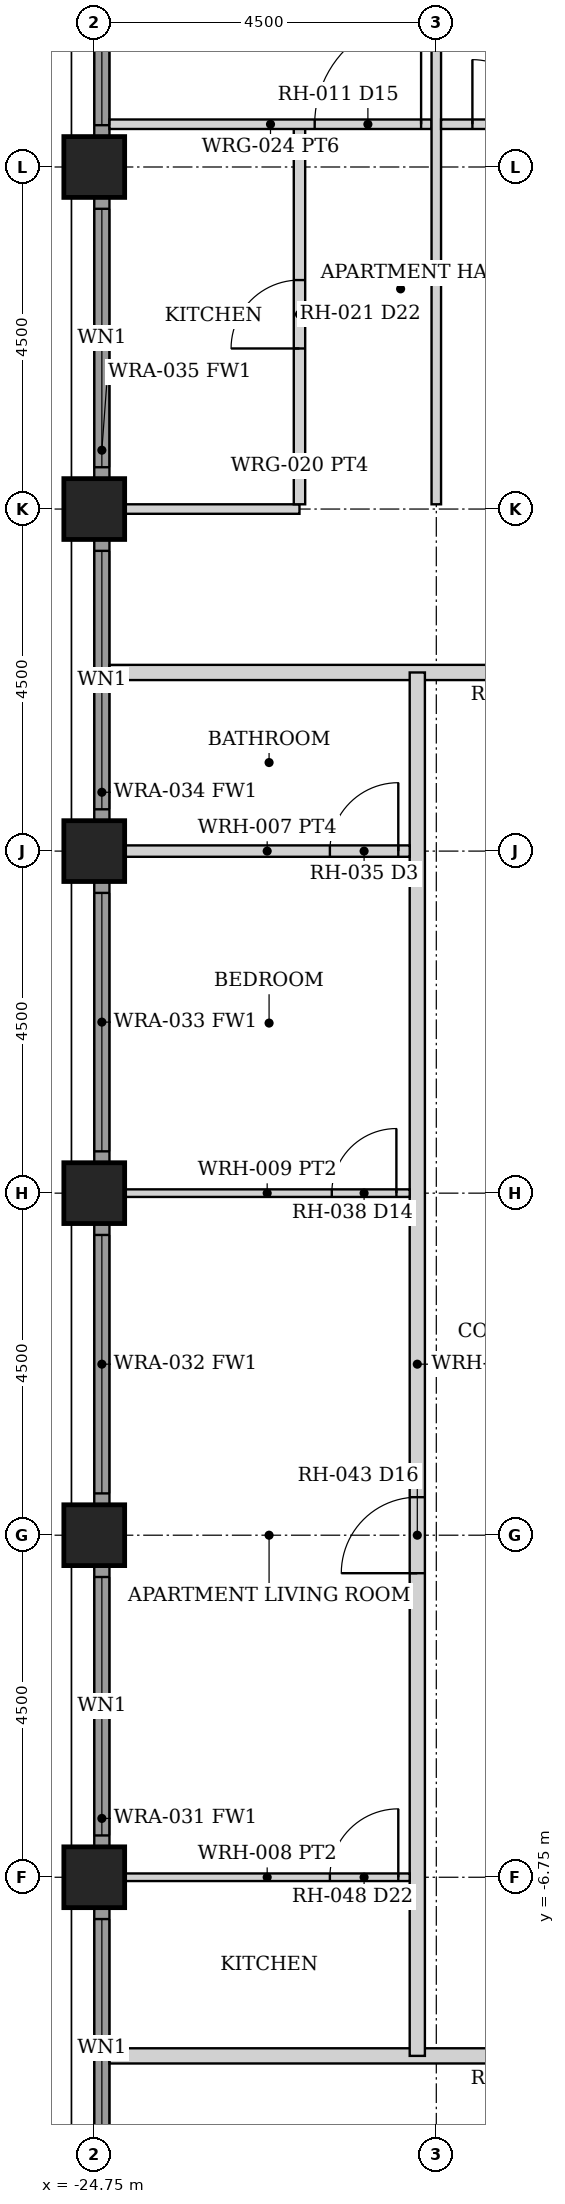
"""IFC4 building model, lengths in metres.
Left out: names, types, materials, properties, quantities, classifications, styles, units other than length and angle.
Written with IfcOpenShell. Run it as: python <this file> out.ifc"""

import sys

from ifc_helpers import new_model, si_unit, direction, frame, frame_2d, origin, origin_2d, place, context, subcontext, project, spatial, rectangle, hollow_rectangle, extrude, element, fill, save


model = new_model("IFC4")
c1 = context("Model", 3, precision=1e-05, world=origin(), true_north=direction((0.0, 1.0)))
c2 = subcontext(c1, "Body", "Model", "MODEL_VIEW")
j1 = project(units=[si_unit("LENGTHUNIT", "METRE"), si_unit("PLANEANGLEUNIT", "RADIAN")], contexts=[c1])
p1 = place(None, origin())
s1 = spatial("IfcSite", under=j1, at=p1, CompositionType="ELEMENT")
p2 = place(p1, origin())
s2 = spatial("IfcBuilding", under=s1, at=p2, CompositionType="ELEMENT")
p3 = place(p2, frame((0.0, 0.0, 100.0)))
s3 = spatial("IfcBuildingStorey", under=s2, at=p3, CompositionType="ELEMENT", Elevation=100.0)
for number, where, z_axis, x_axis in (
    (1, (-24.75, -6.75, 0.0), (0.0, 0.0, 1.0), (1.0, 0.0, 0.0)),
    (2, (-24.75, -2.25, 0.0), (0.0, 0.0, 1.0), (1.0, 0.0, 0.0)),
    (3, (-24.75, 2.25, 0.0), (0.0, 0.0, 1.0), (1.0, 0.0, 0.0)),
    (4, (-24.75, 6.75, 0.0), (0.0, 0.0, 1.0), (1.0, 0.0, 0.0)),
    (5, (-24.75, 11.25, 0.0), (0.0, 0.0, 1.0), (1.0, 0.0, 0.0)),
    (6, (-24.75, 15.75, 0.0), (0.0, 0.0, 1.0), (1.0, 0.0, 0.0)),
):
    element("IfcColumn", number, at=place(p3, frame(where, z_axis=z_axis, x_axis=x_axis)), inside=s3, PredefinedType="COLUMN", context=c2, shape_type="SweptSolid", body=[
        extrude(hollow_rectangle(XDim=0.8, YDim=0.8, WallThickness=0.06, at=origin_2d()), origin(), (0.0, 0.0, 1.0), 3.5),
    ])
p4 = place(p3, frame((-24.65, -10.845, 0.0), z_axis=(0.0, 0.0, 1.0), x_axis=(0.0, 1.0, 0.0)))
e7 = element("IfcWall", 7, at=p4, inside=s3, PredefinedType="SOLIDWALL", context=c2, shape_type="SweptSolid", body=[
    extrude(rectangle(XDim=3.69, YDim=0.2, at=frame_2d((1.845, 0.0))), origin(), (0.0, 0.0, 1.0), 2.379),
])
p5 = place(p4, frame((0.145, 0.0, 0.3)))
e8 = element("IfcOpeningElement", 8, at=p5, cuts=e7, PredefinedType="OPENING", context=c2, shape_type="SweptSolid", body=[
    extrude(rectangle(XDim=3.4, YDim=1.929, at=frame_2d((1.7, 0.964))), frame((0.0, 0.11, 0.0), z_axis=(0.0, -1.0, 0.0), x_axis=(1.0, 0.0, 0.0)), (0.0, 0.0, 1.0), 0.22),
])
p6 = place(p3, frame((-24.65, -6.345, 0.0), z_axis=(0.0, 0.0, 1.0), x_axis=(0.0, 1.0, 0.0)))
e9 = element("IfcWall", 9, at=p6, inside=s3, PredefinedType="SOLIDWALL", context=c2, shape_type="SweptSolid", body=[
    extrude(rectangle(XDim=3.69, YDim=0.2, at=frame_2d((1.845, 0.0))), origin(), (0.0, 0.0, 1.0), 2.379),
])
p7 = place(p6, frame((0.145, 0.0, 0.3)))
e10 = element("IfcOpeningElement", 10, at=p7, cuts=e9, PredefinedType="OPENING", context=c2, shape_type="SweptSolid", body=[
    extrude(rectangle(XDim=3.4, YDim=1.929, at=frame_2d((1.7, 0.964))), frame((0.0, 0.11, 0.0), z_axis=(0.0, -1.0, 0.0), x_axis=(1.0, 0.0, 0.0)), (0.0, 0.0, 1.0), 0.22),
])
p8 = place(p3, frame((-24.65, -1.845, 0.0), z_axis=(0.0, 0.0, 1.0), x_axis=(0.0, 1.0, 0.0)))
e11 = element("IfcWall", 11, at=p8, inside=s3, PredefinedType="SOLIDWALL", context=c2, shape_type="SweptSolid", body=[
    extrude(rectangle(XDim=3.69, YDim=0.2, at=frame_2d((1.845, 0.0))), origin(), (0.0, 0.0, 1.0), 2.379),
])
p9 = place(p8, frame((0.145, 0.0, 0.3)))
e12 = element("IfcOpeningElement", 12, at=p9, cuts=e11, PredefinedType="OPENING", context=c2, shape_type="SweptSolid", body=[
    extrude(rectangle(XDim=3.4, YDim=1.929, at=frame_2d((1.7, 0.964))), frame((0.0, 0.11, 0.0), z_axis=(0.0, -1.0, 0.0), x_axis=(1.0, 0.0, 0.0)), (0.0, 0.0, 1.0), 0.22),
])
p10 = place(p3, frame((-24.65, 2.655, 0.0), z_axis=(0.0, 0.0, 1.0), x_axis=(0.0, 1.0, 0.0)))
e13 = element("IfcWall", 13, at=p10, inside=s3, PredefinedType="SOLIDWALL", context=c2, shape_type="SweptSolid", body=[
    extrude(rectangle(XDim=3.69, YDim=0.2, at=frame_2d((1.845, 0.0))), origin(), (0.0, 0.0, 1.0), 2.379),
])
p11 = place(p10, frame((0.145, 0.0, 0.3)))
e14 = element("IfcOpeningElement", 14, at=p11, cuts=e13, PredefinedType="OPENING", context=c2, shape_type="SweptSolid", body=[
    extrude(rectangle(XDim=3.4, YDim=1.929, at=frame_2d((1.7, 0.964))), frame((0.0, 0.11, 0.0), z_axis=(0.0, -1.0, 0.0), x_axis=(1.0, 0.0, 0.0)), (0.0, 0.0, 1.0), 0.22),
])
p12 = place(p3, frame((-24.65, 7.155, 0.0), z_axis=(0.0, 0.0, 1.0), x_axis=(0.0, 1.0, 0.0)))
e15 = element("IfcWall", 15, at=p12, inside=s3, PredefinedType="SOLIDWALL", context=c2, shape_type="SweptSolid", body=[
    extrude(rectangle(XDim=3.69, YDim=0.2, at=frame_2d((1.845, 0.0))), origin(), (0.0, 0.0, 1.0), 2.379),
])
p13 = place(p12, frame((0.145, 0.0, 0.3)))
e16 = element("IfcOpeningElement", 16, at=p13, cuts=e15, PredefinedType="OPENING", context=c2, shape_type="SweptSolid", body=[
    extrude(rectangle(XDim=3.4, YDim=1.929, at=frame_2d((1.7, 0.964))), frame((0.0, 0.11, 0.0), z_axis=(0.0, -1.0, 0.0), x_axis=(1.0, 0.0, 0.0)), (0.0, 0.0, 1.0), 0.22),
])
p14 = place(p3, frame((-24.65, 11.655, 0.0), z_axis=(0.0, 0.0, 1.0), x_axis=(0.0, 1.0, 0.0)))
e17 = element("IfcWall", 17, at=p14, inside=s3, PredefinedType="SOLIDWALL", context=c2, shape_type="SweptSolid", body=[
    extrude(rectangle(XDim=3.69, YDim=0.2, at=frame_2d((1.845, 0.0))), origin(), (0.0, 0.0, 1.0), 2.379),
])
p15 = place(p14, frame((0.145, 0.0, 0.3)))
e18 = element("IfcOpeningElement", 18, at=p15, cuts=e17, PredefinedType="OPENING", context=c2, shape_type="SweptSolid", body=[
    extrude(rectangle(XDim=3.4, YDim=1.929, at=frame_2d((1.7, 0.964))), frame((0.0, 0.11, 0.0), z_axis=(0.0, -1.0, 0.0), x_axis=(1.0, 0.0, 0.0)), (0.0, 0.0, 1.0), 0.22),
])
p16 = place(p3, frame((-24.65, 16.155, 0.0), z_axis=(0.0, 0.0, 1.0), x_axis=(0.0, 1.0, 0.0)))
e19 = element("IfcWall", 19, at=p16, inside=s3, PredefinedType="SOLIDWALL", context=c2, shape_type="SweptSolid", body=[
    extrude(rectangle(XDim=3.69, YDim=0.2, at=frame_2d((1.845, 0.0))), origin(), (0.0, 0.0, 1.0), 2.379),
])
p17 = place(p16, frame((0.145, 0.0, 0.3)))
e20 = element("IfcOpeningElement", 20, at=p17, cuts=e19, PredefinedType="OPENING", context=c2, shape_type="SweptSolid", body=[
    extrude(rectangle(XDim=3.4, YDim=1.929, at=frame_2d((1.7, 0.964))), frame((0.0, 0.11, 0.0), z_axis=(0.0, -1.0, 0.0), x_axis=(1.0, 0.0, 0.0)), (0.0, 0.0, 1.0), 0.22),
])
p18 = place(p3, frame((-24.55, 9.1, 0.0), z_axis=(0.0, 0.0, 1.0), x_axis=(1.0, 0.0, 0.0)))
e21 = element("IfcWall", 21, at=p18, inside=s3, PredefinedType="PARTITIONING", context=c2, shape_type="SweptSolid", body=[
    extrude(rectangle(XDim=49.1, YDim=0.2, at=frame_2d((24.55, 0.0))), origin(), (0.0, 0.0, 1.0), 2.373),
])
p19 = place(p18, frame((5.05, 0.0, 0.0)))
e22 = element("IfcOpeningElement", 22, at=p19, cuts=e21, PredefinedType="OPENING", context=c2, shape_type="SweptSolid", body=[
    extrude(rectangle(XDim=1.0, YDim=2.3, at=frame_2d((0.5, 1.15))), frame((0.0, 0.11, 0.0), z_axis=(0.0, -1.0, 0.0), x_axis=(1.0, 0.0, 0.0)), (0.0, 0.0, 1.0), 0.22),
])
p20 = place(p18, frame((22.5, 0.0, 0.0)))
e23 = element("IfcOpeningElement", 23, at=p20, cuts=e21, PredefinedType="OPENING", context=c2, shape_type="SweptSolid", body=[
    extrude(rectangle(XDim=0.9, YDim=2.1, at=frame_2d((0.45, 1.05))), frame((0.0, 0.11, 0.0), z_axis=(0.0, -1.0, 0.0), x_axis=(1.0, 0.0, 0.0)), (0.0, 0.0, 1.0), 0.22),
])
p21 = place(p18, frame((43.05, 0.0, 0.0)))
e24 = element("IfcOpeningElement", 24, at=p21, cuts=e21, PredefinedType="OPENING", context=c2, shape_type="SweptSolid", body=[
    extrude(rectangle(XDim=1.0, YDim=2.3, at=frame_2d((0.5, 1.15))), frame((0.0, 0.11, 0.0), z_axis=(0.0, -1.0, 0.0), x_axis=(1.0, 0.0, 0.0)), (0.0, 0.0, 1.0), 0.22),
])
p22 = place(p3, frame((-24.55, -9.1, 0.0), z_axis=(0.0, 0.0, 1.0), x_axis=(1.0, 0.0, 0.0)))
e25 = element("IfcWall", 25, at=p22, inside=s3, PredefinedType="PARTITIONING", context=c2, shape_type="SweptSolid", body=[
    extrude(rectangle(XDim=49.1, YDim=0.2, at=frame_2d((24.55, 0.0))), origin(), (0.0, 0.0, 1.0), 2.373),
])
p23 = place(p22, frame((5.05, 0.0, 0.0)))
e26 = element("IfcOpeningElement", 26, at=p23, cuts=e25, PredefinedType="OPENING", context=c2, shape_type="SweptSolid", body=[
    extrude(rectangle(XDim=1.0, YDim=2.3, at=frame_2d((0.5, 1.15))), frame((0.0, 0.11, 0.0), z_axis=(0.0, -1.0, 0.0), x_axis=(1.0, 0.0, 0.0)), (0.0, 0.0, 1.0), 0.22),
])
p24 = place(p22, frame((22.5, 0.0, 0.0)))
e27 = element("IfcOpeningElement", 27, at=p24, cuts=e25, PredefinedType="OPENING", context=c2, shape_type="SweptSolid", body=[
    extrude(rectangle(XDim=0.9, YDim=2.1, at=frame_2d((0.45, 1.05))), frame((0.0, 0.11, 0.0), z_axis=(0.0, -1.0, 0.0), x_axis=(1.0, 0.0, 0.0)), (0.0, 0.0, 1.0), 0.22),
])
p25 = place(p22, frame((43.05, 0.0, 0.0)))
e28 = element("IfcOpeningElement", 28, at=p25, cuts=e25, PredefinedType="OPENING", context=c2, shape_type="SweptSolid", body=[
    extrude(rectangle(XDim=1.0, YDim=2.3, at=frame_2d((0.5, 1.15))), frame((0.0, 0.11, 0.0), z_axis=(0.0, -1.0, 0.0), x_axis=(1.0, 0.0, 0.0)), (0.0, 0.0, 1.0), 0.22),
])
p26 = place(p3, frame((-20.5, -9.1, 0.0), z_axis=(0.0, 0.0, 1.0), x_axis=(0.0, 1.0, 0.0)))
e29 = element("IfcWall", 29, at=p26, inside=s3, PredefinedType="PARTITIONING", context=c2, shape_type="SweptSolid", body=[
    extrude(rectangle(XDim=18.2, YDim=0.2, at=frame_2d((9.1, 0.0))), origin(), (0.0, 0.0, 1.0), 2.373),
])
p27 = place(p26, frame((6.35, 0.0, 0.0)))
e30 = element("IfcOpeningElement", 30, at=p27, cuts=e29, PredefinedType="OPENING", context=c2, shape_type="SweptSolid", body=[
    extrude(rectangle(XDim=1.0, YDim=2.3, at=frame_2d((0.5, 1.15))), frame((0.0, 0.11, 0.0), z_axis=(0.0, -1.0, 0.0), x_axis=(1.0, 0.0, 0.0)), (0.0, 0.0, 1.0), 0.22),
])
p28 = place(p3, frame((-24.35, 11.25, 0.0), z_axis=(0.0, 0.0, 1.0), x_axis=(1.0, 0.0, 0.0)))
e31 = element("IfcWall", 31, at=p28, inside=s3, PredefinedType="PARTITIONING", context=c2, shape_type="SweptSolid", body=[
    extrude(rectangle(XDim=2.3, YDim=0.125, at=frame_2d((1.15, 0.0))), origin(), (0.0, 0.0, 1.0), 2.373),
])
p29 = place(p3, frame((-22.05, 11.312, 0.0), z_axis=(0.0, 0.0, 1.0), x_axis=(0.0, 1.0, 0.0)))
e32 = element("IfcWall", 32, at=p29, inside=s3, PredefinedType="PARTITIONING", context=c2, shape_type="SweptSolid", body=[
    extrude(rectangle(XDim=5.0, YDim=0.15, at=frame_2d((2.5, 0.0))), origin(), (0.0, 0.0, 1.0), 2.373),
])
p30 = place(p29, frame((2.05, 0.0, 0.0)))
e33 = element("IfcOpeningElement", 33, at=p30, cuts=e32, PredefinedType="OPENING", context=c2, shape_type="SweptSolid", body=[
    extrude(rectangle(XDim=0.9, YDim=2.1, at=frame_2d((0.45, 1.05))), frame((0.0, 0.085, 0.0), z_axis=(0.0, -1.0, 0.0), x_axis=(1.0, 0.0, 0.0)), (0.0, 0.0, 1.0), 0.17),
])
p31 = place(p3, frame((-24.55, 16.312, 0.0), z_axis=(0.0, 0.0, 1.0), x_axis=(1.0, 0.0, 0.0)))
e34 = element("IfcWall", 34, at=p31, inside=s3, PredefinedType="PARTITIONING", context=c2, shape_type="SweptSolid", body=[
    extrude(rectangle(XDim=4.238, YDim=0.125, at=frame_2d((2.119, 0.0))), origin(), (0.0, 0.0, 1.0), 2.373),
])
p32 = place(p31, frame((2.7, 0.0, 0.0)))
e35 = element("IfcOpeningElement", 35, at=p32, cuts=e34, PredefinedType="OPENING", context=c2, shape_type="SweptSolid", body=[
    extrude(rectangle(XDim=1.4, YDim=2.1, at=frame_2d((0.7, 1.05))), frame((0.0, 0.073, 0.0), z_axis=(0.0, -1.0, 0.0), x_axis=(1.0, 0.0, 0.0)), (0.0, 0.0, 1.0), 0.145),
])
p33 = place(p3, frame((-20.25, 11.312, 0.0), z_axis=(0.0, 0.0, 1.0), x_axis=(0.0, 1.0, 0.0)))
e36 = element("IfcWall", 36, at=p33, inside=s3, PredefinedType="PARTITIONING", context=c2, shape_type="SweptSolid", body=[
    extrude(rectangle(XDim=13.038, YDim=0.125, at=frame_2d((6.519, 0.0))), origin(), (0.0, 0.0, 1.0), 2.373),
])
p34 = place(p3, frame((-20.188, 16.312, 0.0), z_axis=(0.0, 0.0, 1.0), x_axis=(1.0, 0.0, 0.0)))
e37 = element("IfcWall", 37, at=p34, inside=s3, PredefinedType="PARTITIONING", context=c2, shape_type="SweptSolid", body=[
    extrude(rectangle(XDim=4.375, YDim=0.125, at=frame_2d((2.188, 0.0))), origin(), (0.0, 0.0, 1.0), 2.373),
])
p35 = place(p34, frame((0.413, 0.0, 0.0)))
e38 = element("IfcOpeningElement", 38, at=p35, cuts=e37, PredefinedType="OPENING", context=c2, shape_type="SweptSolid", body=[
    extrude(rectangle(XDim=0.85, YDim=2.1, at=frame_2d((0.425, 1.05))), frame((0.0, 0.073, 0.0), z_axis=(0.0, -1.0, 0.0), x_axis=(1.0, 0.0, 0.0)), (0.0, 0.0, 1.0), 0.145),
])
p36 = place(p34, frame((2.694, 0.0, 0.0)))
e39 = element("IfcOpeningElement", 39, at=p36, cuts=e37, PredefinedType="OPENING", context=c2, shape_type="SweptSolid", body=[
    extrude(rectangle(XDim=0.8, YDim=2.1, at=frame_2d((0.4, 1.05))), frame((0.0, 0.073, 0.0), z_axis=(0.0, -1.0, 0.0), x_axis=(1.0, 0.0, 0.0)), (0.0, 0.0, 1.0), 0.145),
])
p37 = place(p3, frame((-24.35, -6.75, 0.0), z_axis=(0.0, 0.0, 1.0), x_axis=(1.0, 0.0, 0.0)))
e40 = element("IfcWall", 40, at=p37, inside=s3, PredefinedType="PARTITIONING", context=c2, shape_type="SweptSolid", body=[
    extrude(rectangle(XDim=3.75, YDim=0.1, at=frame_2d((1.875, 0.0))), origin(), (0.0, 0.0, 1.0), 2.373),
])
p38 = place(p37, frame((2.7, 0.0, 0.0)))
e41 = element("IfcOpeningElement", 41, at=p38, cuts=e40, PredefinedType="OPENING", context=c2, shape_type="SweptSolid", body=[
    extrude(rectangle(XDim=0.9, YDim=2.1, at=frame_2d((0.45, 1.05))), frame((0.0, 0.06, 0.0), z_axis=(0.0, -1.0, 0.0), x_axis=(1.0, 0.0, 0.0)), (0.0, 0.0, 1.0), 0.12),
])
p39 = place(p3, frame((-24.35, 2.25, 0.0), z_axis=(0.0, 0.0, 1.0), x_axis=(1.0, 0.0, 0.0)))
e42 = element("IfcWall", 42, at=p39, inside=s3, PredefinedType="PARTITIONING", context=c2, shape_type="SweptSolid", body=[
    extrude(rectangle(XDim=3.75, YDim=0.1, at=frame_2d((1.875, 0.0))), origin(), (0.0, 0.0, 1.0), 2.373),
])
p40 = place(p39, frame((2.725, 0.0, 0.0)))
e43 = element("IfcOpeningElement", 43, at=p40, cuts=e42, PredefinedType="OPENING", context=c2, shape_type="SweptSolid", body=[
    extrude(rectangle(XDim=0.85, YDim=2.1, at=frame_2d((0.425, 1.05))), frame((0.0, 0.06, 0.0), z_axis=(0.0, -1.0, 0.0), x_axis=(1.0, 0.0, 0.0)), (0.0, 0.0, 1.0), 0.12),
])
p41 = place(p3, frame((-24.35, 6.75, 0.0), z_axis=(0.0, 0.0, 1.0), x_axis=(1.0, 0.0, 0.0)))
e44 = element("IfcWall", 44, at=p41, inside=s3, PredefinedType="PARTITIONING", context=c2, shape_type="SweptSolid", body=[
    extrude(rectangle(XDim=3.75, YDim=0.15, at=frame_2d((1.875, 0.0))), origin(), (0.0, 0.0, 1.0), 2.373),
])
p42 = place(p41, frame((2.7, 0.0, 0.0)))
e45 = element("IfcOpeningElement", 45, at=p42, cuts=e44, PredefinedType="OPENING", context=c2, shape_type="SweptSolid", body=[
    extrude(rectangle(XDim=0.9, YDim=2.1, at=frame_2d((0.45, 1.05))), frame((0.0, 0.085, 0.0), z_axis=(0.0, -1.0, 0.0), x_axis=(1.0, 0.0, 0.0)), (0.0, 0.0, 1.0), 0.17),
])
p43 = place(p5, origin())
e46 = element("IfcWindow", 46, at=p43, inside=s3, PartitioningType="SINGLE_PANEL", PredefinedType="WINDOW", context=c2, shape_type="SweptSolid", body=[
    extrude(rectangle(XDim=3.4, YDim=1.929, at=frame_2d((1.7, 0.964))), frame((0.0, 0.03, 0.0), z_axis=(0.0, -1.0, 0.0), x_axis=(1.0, 0.0, 0.0)), (0.0, 0.0, 1.0), 0.06),
])
fill(e8, e46)
p44 = place(p7, origin())
e47 = element("IfcWindow", 47, at=p44, inside=s3, PartitioningType="SINGLE_PANEL", PredefinedType="WINDOW", context=c2, shape_type="SweptSolid", body=[
    extrude(rectangle(XDim=3.4, YDim=1.929, at=frame_2d((1.7, 0.964))), frame((0.0, 0.03, 0.0), z_axis=(0.0, -1.0, 0.0), x_axis=(1.0, 0.0, 0.0)), (0.0, 0.0, 1.0), 0.06),
])
fill(e10, e47)
p45 = place(p9, origin())
e48 = element("IfcWindow", 48, at=p45, inside=s3, PartitioningType="SINGLE_PANEL", PredefinedType="WINDOW", context=c2, shape_type="SweptSolid", body=[
    extrude(rectangle(XDim=3.4, YDim=1.929, at=frame_2d((1.7, 0.964))), frame((0.0, 0.03, 0.0), z_axis=(0.0, -1.0, 0.0), x_axis=(1.0, 0.0, 0.0)), (0.0, 0.0, 1.0), 0.06),
])
fill(e12, e48)
p46 = place(p11, origin())
e49 = element("IfcWindow", 49, at=p46, inside=s3, PartitioningType="SINGLE_PANEL", PredefinedType="WINDOW", context=c2, shape_type="SweptSolid", body=[
    extrude(rectangle(XDim=3.4, YDim=1.929, at=frame_2d((1.7, 0.964))), frame((0.0, 0.03, 0.0), z_axis=(0.0, -1.0, 0.0), x_axis=(1.0, 0.0, 0.0)), (0.0, 0.0, 1.0), 0.06),
])
fill(e14, e49)
p47 = place(p13, origin())
e50 = element("IfcWindow", 50, at=p47, inside=s3, PartitioningType="SINGLE_PANEL", PredefinedType="WINDOW", context=c2, shape_type="SweptSolid", body=[
    extrude(rectangle(XDim=3.4, YDim=1.929, at=frame_2d((1.7, 0.964))), frame((0.0, 0.03, 0.0), z_axis=(0.0, -1.0, 0.0), x_axis=(1.0, 0.0, 0.0)), (0.0, 0.0, 1.0), 0.06),
])
fill(e16, e50)
p48 = place(p15, origin())
e51 = element("IfcWindow", 51, at=p48, inside=s3, PartitioningType="SINGLE_PANEL", PredefinedType="WINDOW", context=c2, shape_type="SweptSolid", body=[
    extrude(rectangle(XDim=3.4, YDim=1.929, at=frame_2d((1.7, 0.964))), frame((0.0, 0.03, 0.0), z_axis=(0.0, -1.0, 0.0), x_axis=(1.0, 0.0, 0.0)), (0.0, 0.0, 1.0), 0.06),
])
fill(e18, e51)
p49 = place(p17, origin())
e52 = element("IfcWindow", 52, at=p49, inside=s3, PartitioningType="SINGLE_PANEL", PredefinedType="WINDOW", context=c2, shape_type="SweptSolid", body=[
    extrude(rectangle(XDim=3.4, YDim=1.929, at=frame_2d((1.7, 0.964))), frame((0.0, 0.03, 0.0), z_axis=(0.0, -1.0, 0.0), x_axis=(1.0, 0.0, 0.0)), (0.0, 0.0, 1.0), 0.06),
])
fill(e20, e52)
p50 = place(p30, origin())
e53 = element("IfcDoor", 53, at=p50, inside=s3, OperationType="SINGLE_SWING_LEFT", PredefinedType="DOOR", context=c2, shape_type="SweptSolid", body=[
    extrude(rectangle(XDim=0.9, YDim=2.1, at=frame_2d((0.45, 1.05))), frame((0.0, 0.025, 0.0), z_axis=(0.0, -1.0, 0.0), x_axis=(1.0, 0.0, 0.0)), (0.0, 0.0, 1.0), 0.05),
])
fill(e33, e53)
p51 = place(p32, origin())
e54 = element("IfcDoor", 54, at=p51, inside=s3, OperationType="SINGLE_SWING_RIGHT", PredefinedType="DOOR", context=c2, shape_type="SweptSolid", body=[
    extrude(rectangle(XDim=1.4, YDim=2.1, at=frame_2d((0.7, 1.05))), frame((0.0, 0.025, 0.0), z_axis=(0.0, -1.0, 0.0), x_axis=(1.0, 0.0, 0.0)), (0.0, 0.0, 1.0), 0.05),
])
fill(e35, e54)
p52 = place(p35, origin())
e55 = element("IfcDoor", 55, at=p52, inside=s3, OperationType="SINGLE_SWING_LEFT", PredefinedType="DOOR", context=c2, shape_type="SweptSolid", body=[
    extrude(rectangle(XDim=0.85, YDim=2.1, at=frame_2d((0.425, 1.05))), frame((0.0, 0.025, 0.0), z_axis=(0.0, -1.0, 0.0), x_axis=(1.0, 0.0, 0.0)), (0.0, 0.0, 1.0), 0.05),
])
fill(e38, e55)
p53 = place(p38, origin())
e56 = element("IfcDoor", 56, at=p53, inside=s3, OperationType="SINGLE_SWING_RIGHT", PredefinedType="DOOR", context=c2, shape_type="SweptSolid", body=[
    extrude(rectangle(XDim=0.9, YDim=2.1, at=frame_2d((0.45, 1.05))), frame((0.0, 0.025, 0.0), z_axis=(0.0, -1.0, 0.0), x_axis=(1.0, 0.0, 0.0)), (0.0, 0.0, 1.0), 0.05),
])
fill(e41, e56)
p54 = place(p40, origin())
e57 = element("IfcDoor", 57, at=p54, inside=s3, OperationType="SINGLE_SWING_RIGHT", PredefinedType="DOOR", context=c2, shape_type="SweptSolid", body=[
    extrude(rectangle(XDim=0.85, YDim=2.1, at=frame_2d((0.425, 1.05))), frame((0.0, 0.025, 0.0), z_axis=(0.0, -1.0, 0.0), x_axis=(1.0, 0.0, 0.0)), (0.0, 0.0, 1.0), 0.05),
])
fill(e43, e57)
p55 = place(p42, origin())
e58 = element("IfcDoor", 58, at=p55, inside=s3, OperationType="SINGLE_SWING_RIGHT", PredefinedType="DOOR", context=c2, shape_type="SweptSolid", body=[
    extrude(rectangle(XDim=0.9, YDim=2.1, at=frame_2d((0.45, 1.05))), frame((0.0, 0.025, 0.0), z_axis=(0.0, -1.0, 0.0), x_axis=(1.0, 0.0, 0.0)), (0.0, 0.0, 1.0), 0.05),
])
fill(e45, e58)
p56 = place(p27, origin())
e59 = element("IfcDoor", 59, at=p56, inside=s3, OperationType="SINGLE_SWING_LEFT", PredefinedType="DOOR", context=c2, shape_type="SweptSolid", body=[
    extrude(rectangle(XDim=1.0, YDim=2.3, at=frame_2d((0.5, 1.15))), frame((0.0, 0.025, 0.0), z_axis=(0.0, -1.0, 0.0), x_axis=(1.0, 0.0, 0.0)), (0.0, 0.0, 1.0), 0.05),
])
fill(e30, e59)
save(model, sys.argv[1])
